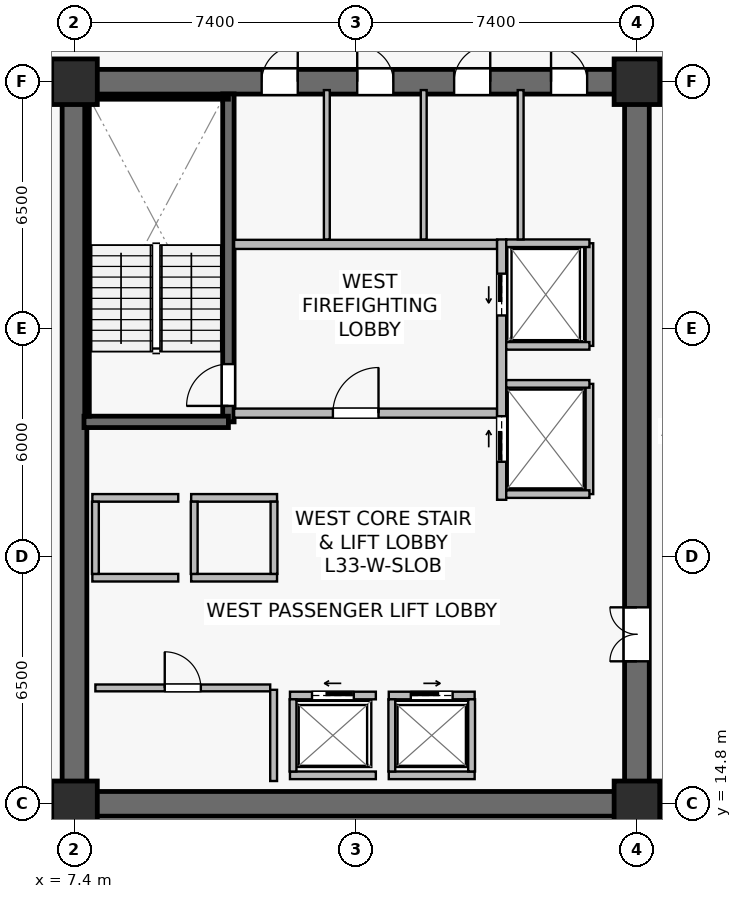
"""IFC4 building model, lengths in metres.
Left out: names, types, materials, properties, quantities, classifications, styles, units other than length and angle.
Written with IfcOpenShell. Run it as: python <this file> out.ifc"""

import sys

from ifc_helpers import new_model, si_unit, direction, frame, frame_2d, origin, origin_2d, place, context, subcontext, project, spatial, rectangle, extrude, source, transform, mapped, element, fill, save


model = new_model("IFC4")
c1 = context("Model", 3, precision=1e-05, world=origin(), true_north=direction((0.0, 1.0)))
c2 = subcontext(c1, "Body", "Model", "MODEL_VIEW")
j1 = project(units=[si_unit("LENGTHUNIT", "METRE"), si_unit("PLANEANGLEUNIT", "RADIAN")], contexts=[c1])
p1 = place(None, origin())
s1 = spatial("IfcSite", under=j1, at=p1, CompositionType="ELEMENT")
p2 = place(p1, origin())
s2 = spatial("IfcBuilding", under=s1, at=p2, CompositionType="ELEMENT")
p3 = place(p2, frame((0.0, 0.0, 137.9)))
s3 = spatial("IfcBuildingStorey", under=s2, at=p3, CompositionType="ELEMENT", Elevation=137.9)
p4 = place(p3, frame((7.075, 14.8, 0.0), z_axis=(0.0, 0.0, 1.0), x_axis=(1.0, 0.0, 0.0)))
e1 = element("IfcWall", 1, at=p4, inside=s3, PredefinedType="SHEAR", context=c2, shape_type="SweptSolid", body=[
    extrude(rectangle(XDim=15.45, YDim=0.65, at=frame_2d((7.725, 0.0))), origin(), (0.0, 0.0, 1.0), 3.79),
])
p5 = place(p3, frame((7.075, 33.8, 0.0), z_axis=(0.0, 0.0, 1.0), x_axis=(1.0, 0.0, 0.0)))
e2 = element("IfcWall", 2, at=p5, inside=s3, PredefinedType="SHEAR", context=c2, shape_type="SweptSolid", body=[
    extrude(rectangle(XDim=15.45, YDim=0.65, at=frame_2d((7.725, 0.0))), origin(), (0.0, 0.0, 1.0), 3.79),
])
p6 = place(p5, frame((5.25, 0.0, 0.0)))
e3 = element("IfcOpeningElement", 3, at=p6, cuts=e2, PredefinedType="OPENING", context=c2, shape_type="SweptSolid", body=[
    extrude(rectangle(XDim=0.95, YDim=2.15, at=frame_2d((0.475, 1.075))), frame((0.0, 0.335, 0.0), z_axis=(0.0, -1.0, 0.0), x_axis=(1.0, 0.0, 0.0)), (0.0, 0.0, 1.0), 0.67),
])
p7 = place(p5, frame((7.765, 0.0, 0.0)))
e4 = element("IfcOpeningElement", 4, at=p7, cuts=e2, PredefinedType="OPENING", context=c2, shape_type="SweptSolid", body=[
    extrude(rectangle(XDim=0.95, YDim=2.15, at=frame_2d((0.475, 1.075))), frame((0.0, 0.335, 0.0), z_axis=(0.0, -1.0, 0.0), x_axis=(1.0, 0.0, 0.0)), (0.0, 0.0, 1.0), 0.67),
])
p8 = place(p5, frame((10.315, 0.0, 0.0)))
e5 = element("IfcOpeningElement", 5, at=p8, cuts=e2, PredefinedType="OPENING", context=c2, shape_type="SweptSolid", body=[
    extrude(rectangle(XDim=0.95, YDim=2.15, at=frame_2d((0.475, 1.075))), frame((0.0, 0.335, 0.0), z_axis=(0.0, -1.0, 0.0), x_axis=(1.0, 0.0, 0.0)), (0.0, 0.0, 1.0), 0.67),
])
p9 = place(p5, frame((12.865, 0.0, 0.0)))
e6 = element("IfcOpeningElement", 6, at=p9, cuts=e2, PredefinedType="OPENING", context=c2, shape_type="SweptSolid", body=[
    extrude(rectangle(XDim=0.95, YDim=2.15, at=frame_2d((0.475, 1.075))), frame((0.0, 0.335, 0.0), z_axis=(0.0, -1.0, 0.0), x_axis=(1.0, 0.0, 0.0)), (0.0, 0.0, 1.0), 0.67),
])
p10 = place(p3, frame((7.4, 15.125, 0.0), z_axis=(0.0, 0.0, 1.0), x_axis=(0.0, 1.0, 0.0)))
e7 = element("IfcWall", 7, at=p10, inside=s3, PredefinedType="SHEAR", context=c2, shape_type="SweptSolid", body=[
    extrude(rectangle(XDim=18.35, YDim=0.65, at=frame_2d((9.175, 0.0))), origin(), (0.0, 0.0, 1.0), 3.79),
])
p11 = place(p3, frame((22.2, 15.125, 0.0), z_axis=(0.0, 0.0, 1.0), x_axis=(0.0, 1.0, 0.0)))
e8 = element("IfcWall", 8, at=p11, inside=s3, PredefinedType="SHEAR", context=c2, shape_type="SweptSolid", body=[
    extrude(rectangle(XDim=18.35, YDim=0.65, at=frame_2d((9.175, 0.0))), origin(), (0.0, 0.0, 1.0), 3.79),
])
p12 = place(p11, frame((3.425, 0.0, 0.0)))
e9 = element("IfcOpeningElement", 9, at=p12, cuts=e8, PredefinedType="OPENING", context=c2, shape_type="SweptSolid", body=[
    extrude(rectangle(XDim=1.42, YDim=2.2, at=frame_2d((0.71, 1.1))), frame((0.0, 0.335, 0.0), z_axis=(0.0, -1.0, 0.0), x_axis=(1.0, 0.0, 0.0)), (0.0, 0.0, 1.0), 0.67),
])
p13 = place(p3, frame((11.45, 24.85, 0.0), z_axis=(0.0, 0.0, 1.0), x_axis=(0.0, 1.0, 0.0)))
e10 = element("IfcWall", 10, at=p13, inside=s3, PredefinedType="SHEAR", context=c2, shape_type="SweptSolid", body=[
    extrude(rectangle(XDim=8.63, YDim=0.3, at=frame_2d((4.315, 0.0))), origin(), (0.0, 0.0, 1.0), 3.79),
])
p14 = place(p13, frame((0.42, 0.0, 0.0)))
e11 = element("IfcOpeningElement", 11, at=p14, cuts=e10, PredefinedType="OPENING", context=c2, shape_type="SweptSolid", body=[
    extrude(rectangle(XDim=1.1, YDim=2.15, at=frame_2d((0.55, 1.075))), frame((0.0, 0.16, 0.0), z_axis=(0.0, -1.0, 0.0), x_axis=(1.0, 0.0, 0.0)), (0.0, 0.0, 1.0), 0.32),
])
p15 = place(p3, frame((7.65, 24.85, 0.0), z_axis=(0.0, 0.0, 1.0), x_axis=(1.0, 0.0, 0.0)))
e12 = element("IfcWall", 12, at=p15, inside=s3, PredefinedType="SHEAR", context=c2, shape_type="SweptSolid", body=[
    extrude(rectangle(XDim=3.8, YDim=0.3, at=frame_2d((1.9, 0.0))), origin(), (0.0, 0.0, 1.0), 3.79),
])
p16 = place(p3, frame((7.73, 33.4, 0.0), z_axis=(0.0, 0.0, 1.0), x_axis=(1.0, 0.0, 0.0)))
e13 = element("IfcWall", 13, at=p16, inside=s3, PredefinedType="SOLIDWALL", context=c2, shape_type="SweptSolid", body=[
    extrude(rectangle(XDim=3.72, YDim=0.12, at=frame_2d((1.86, 0.0))), origin(), (0.0, 0.0, 1.0), 3.79),
])
p17 = place(p3, frame((7.73, 25.0, 0.0), z_axis=(0.0, 0.0, 1.0), x_axis=(0.0, 1.0, 0.0)))
e14 = element("IfcWall", 14, at=p17, inside=s3, PredefinedType="SOLIDWALL", context=c2, shape_type="SweptSolid", body=[
    extrude(rectangle(XDim=8.32, YDim=0.12, at=frame_2d((4.16, 0.0))), origin(), (0.0, 0.0, 1.0), 3.79),
])
m1 = source(origin(), c2, "Body", "SweptSolid", [
    extrude(rectangle(XDim=1.2, YDim=1.2, at=origin_2d()), origin(), (0.0, 0.0, 1.0), 4.1),
])
for number, where, z_axis, x_axis in (
    (15, (7.4, 14.8, 0.0), (0.0, 0.0, 1.0), (1.0, 0.0, 0.0)),
    (16, (22.2, 14.8, 0.0), (0.0, 0.0, 1.0), (1.0, 0.0, 0.0)),
    (17, (7.4, 33.8, 0.0), (0.0, 0.0, 1.0), (1.0, 0.0, 0.0)),
    (18, (22.2, 33.8, 0.0), (0.0, 0.0, 1.0), (1.0, 0.0, 0.0)),
):
    element("IfcColumn", number, at=place(p3, frame(where, z_axis=z_axis, x_axis=x_axis)), inside=s3, PredefinedType="COLUMN", context=c2, shape_type="MappedRepresentation", body=[
        mapped(m1, transform((0.0, 0.0, 0.0), scale=1.0)),
    ])
p18 = place(p3, frame((11.6, 25.08, 0.0), z_axis=(0.0, 0.0, 1.0), x_axis=(1.0, 0.0, 0.0)))
e19 = element("IfcWall", 19, at=p18, inside=s3, PredefinedType="SOLIDWALL", context=c2, shape_type="SweptSolid", body=[
    extrude(rectangle(XDim=6.92, YDim=0.24, at=frame_2d((3.46, 0.0))), origin(), (0.0, 0.0, 1.0), 3.125),
])
p19 = place(p18, frame((2.6, 0.0, 0.0)))
e20 = element("IfcOpeningElement", 20, at=p19, cuts=e19, PredefinedType="OPENING", context=c2, shape_type="SweptSolid", body=[
    extrude(rectangle(XDim=1.2, YDim=2.16, at=frame_2d((0.6, 1.08))), frame((0.0, 0.13, 0.0), z_axis=(0.0, -1.0, 0.0), x_axis=(1.0, 0.0, 0.0)), (0.0, 0.0, 1.0), 0.26),
])
p20 = place(p3, frame((11.6, 29.52, 0.0), z_axis=(0.0, 0.0, 1.0), x_axis=(1.0, 0.0, 0.0)))
e21 = element("IfcWall", 21, at=p20, inside=s3, PredefinedType="SOLIDWALL", context=c2, shape_type="SweptSolid", body=[
    extrude(rectangle(XDim=6.92, YDim=0.24, at=frame_2d((3.46, 0.0))), origin(), (0.0, 0.0, 1.0), 3.125),
])
p21 = place(p3, frame((18.64, 22.8, 0.0), z_axis=(0.0, 0.0, 1.0), x_axis=(0.0, 1.0, 0.0)))
e22 = element("IfcWall", 22, at=p21, inside=s3, PredefinedType="SOLIDWALL", context=c2, shape_type="SweptSolid", body=[
    extrude(rectangle(XDim=6.85, YDim=0.24, at=frame_2d((3.425, 0.0))), origin(), (0.0, 0.0, 1.0), 2.875),
])
p22 = place(p21, frame((4.85, 0.0, 0.0)))
e23 = element("IfcOpeningElement", 23, at=p22, cuts=e22, PredefinedType="OPENING", context=c2, shape_type="SweptSolid", body=[
    extrude(rectangle(XDim=1.1, YDim=2.22, at=frame_2d((0.55, 1.11))), frame((0.0, 0.13, 0.0), z_axis=(0.0, -1.0, 0.0), x_axis=(1.0, 0.0, 0.0)), (0.0, 0.0, 1.0), 0.26),
])
p23 = place(p21, frame((1.0, 0.0, 0.0)))
e24 = element("IfcOpeningElement", 24, at=p23, cuts=e22, PredefinedType="OPENING", context=c2, shape_type="SweptSolid", body=[
    extrude(rectangle(XDim=1.2, YDim=2.22, at=frame_2d((0.6, 1.11))), frame((0.0, 0.13, 0.0), z_axis=(0.0, -1.0, 0.0), x_axis=(1.0, 0.0, 0.0)), (0.0, 0.0, 1.0), 0.26),
])
p24 = place(p3, frame((13.07, 17.65, 0.0), z_axis=(0.0, 0.0, 1.0), x_axis=(1.0, 0.0, 0.0)))
e25 = element("IfcWall", 25, at=p24, inside=s3, PredefinedType="SOLIDWALL", context=c2, shape_type="SweptSolid", body=[
    extrude(rectangle(XDim=2.26, YDim=0.2, at=frame_2d((1.13, 0.0))), origin(), (0.0, 0.0, 1.0), 3.125),
])
p25 = place(p24, frame((0.58, 0.0, 0.0)))
e26 = element("IfcOpeningElement", 26, at=p25, cuts=e25, PredefinedType="OPENING", context=c2, shape_type="SweptSolid", body=[
    extrude(rectangle(XDim=1.1, YDim=2.22, at=frame_2d((0.55, 1.11))), frame((0.0, 0.11, 0.0), z_axis=(0.0, -1.0, 0.0), x_axis=(1.0, 0.0, 0.0)), (0.0, 0.0, 1.0), 0.22),
])
p26 = place(p3, frame((13.07, 15.55, 0.0), z_axis=(0.0, 0.0, 1.0), x_axis=(1.0, 0.0, 0.0)))
e27 = element("IfcWall", 27, at=p26, inside=s3, PredefinedType="SOLIDWALL", context=c2, shape_type="SweptSolid", body=[
    extrude(rectangle(XDim=2.26, YDim=0.2, at=frame_2d((1.13, 0.0))), origin(), (0.0, 0.0, 1.0), 3.125),
])
p27 = place(p3, frame((13.15, 15.65, 0.0), z_axis=(0.0, 0.0, 1.0), x_axis=(0.0, 1.0, 0.0)))
e28 = element("IfcWall", 28, at=p27, inside=s3, PredefinedType="SOLIDWALL", context=c2, shape_type="SweptSolid", body=[
    extrude(rectangle(XDim=1.9, YDim=0.18, at=frame_2d((0.95, 0.0))), origin(), (0.0, 0.0, 1.0), 3.79),
])
p28 = place(p3, frame((15.67, 17.65, 0.0), z_axis=(0.0, 0.0, 1.0), x_axis=(1.0, 0.0, 0.0)))
e29 = element("IfcWall", 29, at=p28, inside=s3, PredefinedType="SOLIDWALL", context=c2, shape_type="SweptSolid", body=[
    extrude(rectangle(XDim=2.26, YDim=0.2, at=frame_2d((1.13, 0.0))), origin(), (0.0, 0.0, 1.0), 3.79),
])
p29 = place(p28, frame((0.58, 0.0, 0.0)))
e30 = element("IfcOpeningElement", 30, at=p29, cuts=e29, PredefinedType="OPENING", context=c2, shape_type="SweptSolid", body=[
    extrude(rectangle(XDim=1.1, YDim=2.22, at=frame_2d((0.55, 1.11))), frame((0.0, 0.11, 0.0), z_axis=(0.0, -1.0, 0.0), x_axis=(1.0, 0.0, 0.0)), (0.0, 0.0, 1.0), 0.22),
])
p30 = place(p3, frame((15.67, 15.55, 0.0), z_axis=(0.0, 0.0, 1.0), x_axis=(1.0, 0.0, 0.0)))
e31 = element("IfcWall", 31, at=p30, inside=s3, PredefinedType="SOLIDWALL", context=c2, shape_type="SweptSolid", body=[
    extrude(rectangle(XDim=2.26, YDim=0.2, at=frame_2d((1.13, 0.0))), origin(), (0.0, 0.0, 1.0), 3.79),
])
for number, where, z_axis, x_axis in (
    (32, (15.75, 15.65, 0.0), (0.0, 0.0, 1.0), (0.0, 1.0, 0.0)),
    (33, (17.85, 15.65, 0.0), (0.0, 0.0, 1.0), (0.0, 1.0, 0.0)),
):
    element("IfcWall", number, at=place(p3, frame(where, z_axis=z_axis, x_axis=x_axis)), inside=s3, PredefinedType="SOLIDWALL", context=c2, shape_type="SweptSolid", body=[
        extrude(rectangle(XDim=1.9, YDim=0.18, at=frame_2d((0.95, 0.0))), origin(), (0.0, 0.0, 1.0), 3.79),
    ])
for number, where, z_axis, x_axis in (
    (34, (7.87, 20.75, 0.0), (0.0, 0.0, 1.0), (1.0, 0.0, 0.0)),
    (35, (7.87, 22.85, 0.0), (0.0, 0.0, 1.0), (1.0, 0.0, 0.0)),
):
    element("IfcWall", number, at=place(p3, frame(where, z_axis=z_axis, x_axis=x_axis)), inside=s3, PredefinedType="SOLIDWALL", context=c2, shape_type="SweptSolid", body=[
        extrude(rectangle(XDim=2.26, YDim=0.2, at=frame_2d((1.13, 0.0))), origin(), (0.0, 0.0, 1.0), 3.79),
    ])
p31 = place(p3, frame((7.95, 20.85, 0.0), z_axis=(0.0, 0.0, 1.0), x_axis=(0.0, 1.0, 0.0)))
e36 = element("IfcWall", 36, at=p31, inside=s3, PredefinedType="SOLIDWALL", context=c2, shape_type="SweptSolid", body=[
    extrude(rectangle(XDim=1.9, YDim=0.18, at=frame_2d((0.95, 0.0))), origin(), (0.0, 0.0, 1.0), 3.79),
])
for number, where, z_axis, x_axis in (
    (37, (10.47, 20.75, 0.0), (0.0, 0.0, 1.0), (1.0, 0.0, 0.0)),
    (38, (10.47, 22.85, 0.0), (0.0, 0.0, 1.0), (1.0, 0.0, 0.0)),
):
    element("IfcWall", number, at=place(p3, frame(where, z_axis=z_axis, x_axis=x_axis)), inside=s3, PredefinedType="SOLIDWALL", context=c2, shape_type="SweptSolid", body=[
        extrude(rectangle(XDim=2.26, YDim=0.2, at=frame_2d((1.13, 0.0))), origin(), (0.0, 0.0, 1.0), 3.79),
    ])
for number, where, z_axis, x_axis in (
    (39, (10.55, 20.85, 0.0), (0.0, 0.0, 1.0), (0.0, 1.0, 0.0)),
    (40, (12.65, 20.85, 0.0), (0.0, 0.0, 1.0), (0.0, 1.0, 0.0)),
):
    element("IfcWall", number, at=place(p3, frame(where, z_axis=z_axis, x_axis=x_axis)), inside=s3, PredefinedType="SOLIDWALL", context=c2, shape_type="SweptSolid", body=[
        extrude(rectangle(XDim=1.9, YDim=0.18, at=frame_2d((0.95, 0.0))), origin(), (0.0, 0.0, 1.0), 3.79),
    ])
p32 = place(p3, frame((20.95, 26.85, 0.0), z_axis=(0.0, 0.0, 1.0), x_axis=(0.0, 1.0, 0.0)))
e41 = element("IfcWall", 41, at=p32, inside=s3, PredefinedType="SOLIDWALL", context=c2, shape_type="SweptSolid", body=[
    extrude(rectangle(XDim=2.7, YDim=0.2, at=frame_2d((1.35, 0.0))), origin(), (0.0, 0.0, 1.0), 3.79),
])
p33 = place(p3, frame((18.76, 29.55, 0.0), z_axis=(0.0, 0.0, 1.0), x_axis=(1.0, 0.0, 0.0)))
e42 = element("IfcWall", 42, at=p33, inside=s3, PredefinedType="SOLIDWALL", context=c2, shape_type="SweptSolid", body=[
    extrude(rectangle(XDim=2.19, YDim=0.2, at=frame_2d((1.095, 0.0))), origin(), (0.0, 0.0, 1.0), 3.79),
])
p34 = place(p3, frame((18.76, 26.85, 0.0), z_axis=(0.0, 0.0, 1.0), x_axis=(1.0, 0.0, 0.0)))
e43 = element("IfcWall", 43, at=p34, inside=s3, PredefinedType="SOLIDWALL", context=c2, shape_type="SweptSolid", body=[
    extrude(rectangle(XDim=2.19, YDim=0.2, at=frame_2d((1.095, 0.0))), origin(), (0.0, 0.0, 1.0), 3.187),
])
p35 = place(p3, frame((20.95, 22.95, 0.0), z_axis=(0.0, 0.0, 1.0), x_axis=(0.0, 1.0, 0.0)))
e44 = element("IfcWall", 44, at=p35, inside=s3, PredefinedType="SOLIDWALL", context=c2, shape_type="SweptSolid", body=[
    extrude(rectangle(XDim=2.9, YDim=0.2, at=frame_2d((1.45, 0.0))), origin(), (0.0, 0.0, 1.0), 2.875),
])
for number, where, z_axis, x_axis in (
    (45, (18.76, 25.85, 0.0), (0.0, 0.0, 1.0), (1.0, 0.0, 0.0)),
    (46, (18.76, 22.95, 0.0), (0.0, 0.0, 1.0), (1.0, 0.0, 0.0)),
):
    element("IfcWall", number, at=place(p3, frame(where, z_axis=z_axis, x_axis=x_axis)), inside=s3, PredefinedType="SOLIDWALL", context=c2, shape_type="SweptSolid", body=[
        extrude(rectangle(XDim=2.19, YDim=0.2, at=frame_2d((1.095, 0.0))), origin(), (0.0, 0.0, 1.0), 3.79),
    ])
p36 = place(p3, frame((7.95, 17.85, 0.0), z_axis=(0.0, 0.0, 1.0), x_axis=(1.0, 0.0, 0.0)))
e47 = element("IfcWall", 47, at=p36, inside=s3, PredefinedType="SOLIDWALL", context=c2, shape_type="SweptSolid", body=[
    extrude(rectangle(XDim=4.6, YDim=0.18, at=frame_2d((2.3, 0.0))), origin(), (0.0, 0.0, 1.0), 3.79),
])
p37 = place(p36, frame((1.825, 0.0, 0.0)))
e48 = element("IfcOpeningElement", 48, at=p37, cuts=e47, PredefinedType="OPENING", context=c2, shape_type="SweptSolid", body=[
    extrude(rectangle(XDim=0.95, YDim=2.15, at=frame_2d((0.475, 1.075))), frame((0.0, 0.1, 0.0), z_axis=(0.0, -1.0, 0.0), x_axis=(1.0, 0.0, 0.0)), (0.0, 0.0, 1.0), 0.2),
])
p38 = place(p3, frame((12.64, 15.4, 0.0), z_axis=(0.0, 0.0, 1.0), x_axis=(0.0, 1.0, 0.0)))
e49 = element("IfcWall", 49, at=p38, inside=s3, PredefinedType="SOLIDWALL", context=c2, shape_type="SweptSolid", body=[
    extrude(rectangle(XDim=2.4, YDim=0.18, at=frame_2d((1.2, 0.0))), origin(), (0.0, 0.0, 1.0), 3.79),
])
for number, where, z_axis, x_axis in (
    (50, (14.04, 29.65, 0.0), (0.0, 0.0, 1.0), (0.0, 1.0, 0.0)),
    (51, (16.59, 29.65, 0.0), (0.0, 0.0, 1.0), (0.0, 1.0, 0.0)),
    (52, (19.14, 29.65, 0.0), (0.0, 0.0, 1.0), (0.0, 1.0, 0.0)),
):
    element("IfcWall", number, at=place(p3, frame(where, z_axis=z_axis, x_axis=x_axis)), inside=s3, PredefinedType="PLUMBINGWALL", context=c2, shape_type="SweptSolid", body=[
        extrude(rectangle(XDim=3.93, YDim=0.155, at=frame_2d((1.965, 0.0))), origin(), (0.0, 0.0, 1.0), 3.79),
    ])
m2 = source(origin(), c2, "Body", "SweptSolid", [
    extrude(rectangle(XDim=1.1, YDim=2.15, at=frame_2d((0.55, 1.075))), frame((0.0, 0.025, 0.0), z_axis=(0.0, -1.0, 0.0), x_axis=(1.0, 0.0, 0.0)), (0.0, 0.0, 1.0), 0.05),
])
p39 = place(p14, origin())
e53 = element("IfcDoor", 53, at=p39, inside=s3, OperationType="SINGLE_SWING_LEFT", PredefinedType="DOOR", context=c2, shape_type="MappedRepresentation", body=[
    mapped(m2, transform((0.0, 0.0, 0.0), scale=1.0)),
])
fill(e11, e53)
m3 = source(origin(), c2, "Body", "SweptSolid", [
    extrude(rectangle(XDim=1.2, YDim=2.16, at=frame_2d((0.6, 1.08))), frame((0.0, 0.025, 0.0), z_axis=(0.0, -1.0, 0.0), x_axis=(1.0, 0.0, 0.0)), (0.0, 0.0, 1.0), 0.05),
])
p40 = place(p19, origin())
e54 = element("IfcDoor", 54, at=p40, inside=s3, OperationType="SINGLE_SWING_RIGHT", PredefinedType="DOOR", context=c2, shape_type="MappedRepresentation", body=[
    mapped(m3, transform((0.0, 0.0, 0.0), scale=1.0)),
])
fill(e20, e54)
m4 = source(origin(), c2, "Body", "SweptSolid", [
    extrude(rectangle(XDim=1.1, YDim=2.22, at=frame_2d((0.55, 1.11))), frame((0.0, 0.025, 0.0), z_axis=(0.0, -1.0, 0.0), x_axis=(1.0, 0.0, 0.0)), (0.0, 0.0, 1.0), 0.05),
])
p41 = place(p25, origin())
e55 = element("IfcDoor", 55, at=p41, inside=s3, OperationType="SLIDING_TO_LEFT", PredefinedType="USERDEFINED", context=c2, shape_type="MappedRepresentation", body=[
    mapped(m4, transform((0.0, 0.0, 0.0), scale=1.0)),
])
fill(e26, e55)
p42 = place(p29, origin())
e56 = element("IfcDoor", 56, at=p42, inside=s3, OperationType="SLIDING_TO_RIGHT", PredefinedType="USERDEFINED", context=c2, shape_type="MappedRepresentation", body=[
    mapped(m4, transform((0.0, 0.0, 0.0), scale=1.0)),
])
fill(e30, e56)
p43 = place(p22, origin())
e57 = element("IfcDoor", 57, at=p43, inside=s3, OperationType="SLIDING_TO_LEFT", PredefinedType="USERDEFINED", context=c2, shape_type="MappedRepresentation", body=[
    mapped(m4, transform((0.0, 0.0, 0.0), scale=1.0)),
])
fill(e23, e57)
m5 = source(origin(), c2, "Body", "SweptSolid", [
    extrude(rectangle(XDim=1.2, YDim=2.22, at=frame_2d((0.6, 1.11))), frame((0.0, 0.025, 0.0), z_axis=(0.0, -1.0, 0.0), x_axis=(1.0, 0.0, 0.0)), (0.0, 0.0, 1.0), 0.05),
])
p44 = place(p23, origin())
e58 = element("IfcDoor", 58, at=p44, inside=s3, OperationType="SLIDING_TO_RIGHT", PredefinedType="USERDEFINED", context=c2, shape_type="MappedRepresentation", body=[
    mapped(m5, transform((0.0, 0.0, 0.0), scale=1.0)),
])
fill(e24, e58)
m6 = source(origin(), c2, "Body", "SweptSolid", [
    extrude(rectangle(XDim=0.95, YDim=2.15, at=frame_2d((0.475, 1.075))), frame((0.0, 0.025, 0.0), z_axis=(0.0, -1.0, 0.0), x_axis=(1.0, 0.0, 0.0)), (0.0, 0.0, 1.0), 0.05),
])
p45 = place(p37, origin())
e59 = element("IfcDoor", 59, at=p45, inside=s3, OperationType="SINGLE_SWING_LEFT", PredefinedType="DOOR", context=c2, shape_type="MappedRepresentation", body=[
    mapped(m6, transform((0.0, 0.0, 0.0), scale=1.0)),
])
fill(e48, e59)
m7 = source(origin(), c2, "Body", "SweptSolid", [
    extrude(rectangle(XDim=1.42, YDim=2.2, at=frame_2d((0.71, 1.1))), frame((0.0, 0.025, 0.0), z_axis=(0.0, -1.0, 0.0), x_axis=(1.0, 0.0, 0.0)), (0.0, 0.0, 1.0), 0.05),
])
p46 = place(p12, origin())
e60 = element("IfcDoor", 60, at=p46, inside=s3, OperationType="DOUBLE_DOOR_SINGLE_SWING", PredefinedType="DOOR", context=c2, shape_type="MappedRepresentation", body=[
    mapped(m7, transform((0.0, 0.0, 0.0), scale=1.0)),
])
fill(e9, e60)
p47 = place(p6, origin())
e61 = element("IfcDoor", 61, at=p47, inside=s3, OperationType="SINGLE_SWING_RIGHT", PredefinedType="DOOR", context=c2, shape_type="MappedRepresentation", body=[
    mapped(m6, transform((0.0, 0.0, 0.0), scale=1.0)),
])
fill(e3, e61)
p48 = place(p7, origin())
e62 = element("IfcDoor", 62, at=p48, inside=s3, OperationType="SINGLE_SWING_LEFT", PredefinedType="DOOR", context=c2, shape_type="MappedRepresentation", body=[
    mapped(m6, transform((0.0, 0.0, 0.0), scale=1.0)),
])
fill(e4, e62)
p49 = place(p8, origin())
e63 = element("IfcDoor", 63, at=p49, inside=s3, OperationType="SINGLE_SWING_RIGHT", PredefinedType="DOOR", context=c2, shape_type="MappedRepresentation", body=[
    mapped(m6, transform((0.0, 0.0, 0.0), scale=1.0)),
])
fill(e5, e63)
p50 = place(p9, origin())
e64 = element("IfcDoor", 64, at=p50, inside=s3, OperationType="SINGLE_SWING_LEFT", PredefinedType="DOOR", context=c2, shape_type="MappedRepresentation", body=[
    mapped(m6, transform((0.0, 0.0, 0.0), scale=1.0)),
])
fill(e6, e64)
save(model, sys.argv[1])
